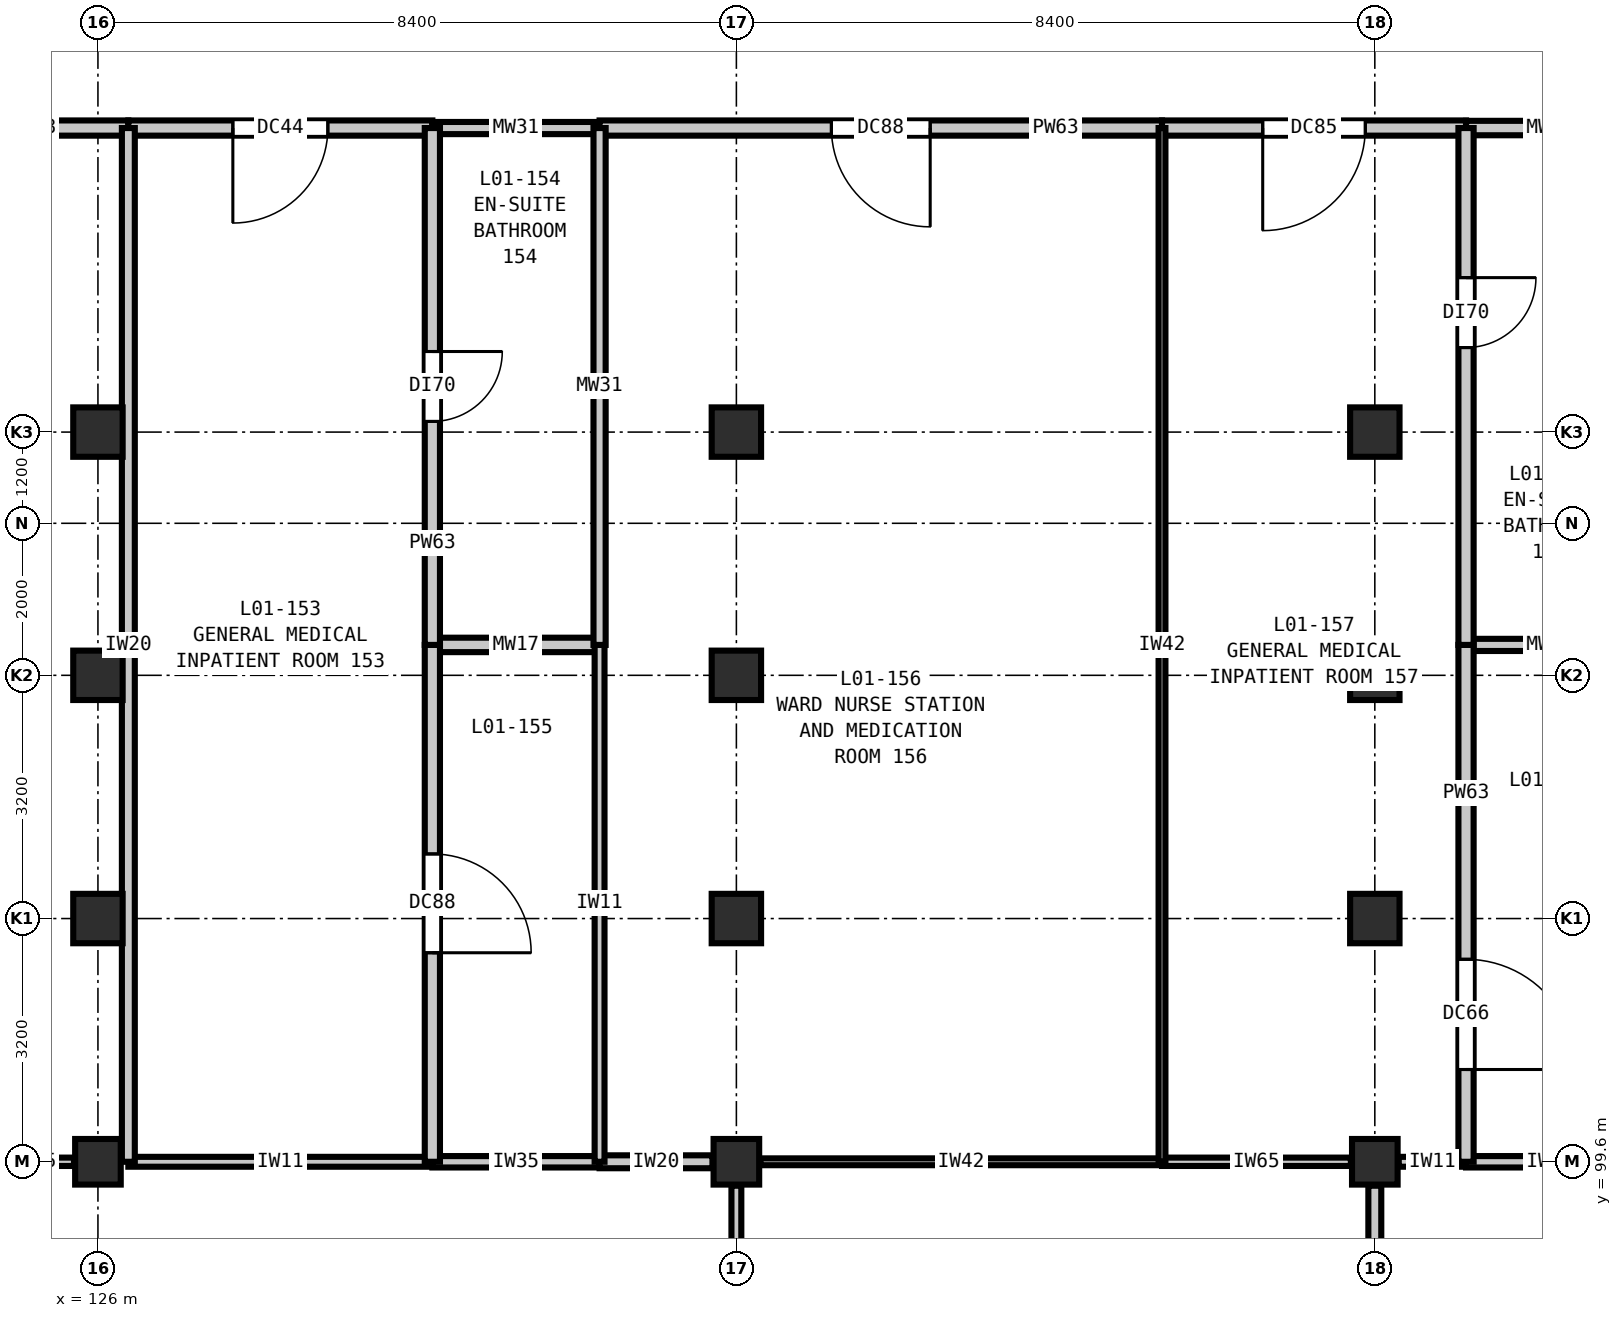
"""IFC4 building model, lengths in metres.
Left out: names, types, materials, properties, quantities, classifications, styles, units other than length and angle.
Written with IfcOpenShell. Run it as: python <this file> out.ifc"""

import sys

from ifc_helpers import new_model, si_unit, direction, frame, frame_2d, origin, origin_2d, place, context, subcontext, project, spatial, rectangle, extrude, element, fill, save


model = new_model("IFC4")
c1 = context("Model", 3, precision=1e-05, world=origin(), true_north=direction((0.0, 1.0)))
c2 = subcontext(c1, "Body", "Model", "MODEL_VIEW")
j1 = project(units=[si_unit("LENGTHUNIT", "METRE"), si_unit("PLANEANGLEUNIT", "RADIAN")], contexts=[c1])
p1 = place(None, origin())
s1 = spatial("IfcSite", under=j1, at=p1, CompositionType="ELEMENT")
p2 = place(p1, origin())
s2 = spatial("IfcBuilding", under=s1, at=p2, CompositionType="ELEMENT")
p3 = place(p2, frame((0.0, 0.0, 5.4)))
s3 = spatial("IfcBuildingStorey", under=s2, at=p3, CompositionType="ELEMENT", Elevation=5.4)
p4 = place(p3, frame((126.0, 99.6, 0.0), z_axis=(0.0, 0.0, 1.0), x_axis=(1.0, 0.0, 0.0)))
e1 = element("IfcColumn", 1, at=p4, inside=s3, PredefinedType="COLUMN", context=c2, shape_type="SweptSolid", body=[
    extrude(rectangle(XDim=0.6, YDim=0.6, at=origin_2d()), origin(), (0.0, 0.0, 1.0), 5.4),
])
for number, where, z_axis, x_axis in (
    (2, (126.0, 102.8, 0.0), (0.0, 0.0, 1.0), (1.0, 0.0, 0.0)),
    (3, (126.0, 106.0, 0.0), (0.0, 0.0, 1.0), (1.0, 0.0, 0.0)),
    (4, (126.0, 109.2, 0.0), (0.0, 0.0, 1.0), (1.0, 0.0, 0.0)),
):
    element("IfcColumn", number, at=place(p3, frame(where, z_axis=z_axis, x_axis=x_axis)), inside=s3, PredefinedType="COLUMN", context=c2, shape_type="SweptSolid", body=[
        extrude(rectangle(XDim=0.65, YDim=0.65, at=origin_2d()), origin(), (0.0, 0.0, 1.0), 5.4),
    ])
p5 = place(p3, frame((134.4, 99.6, 0.0), z_axis=(0.0, 0.0, 1.0), x_axis=(1.0, 0.0, 0.0)))
e5 = element("IfcColumn", 5, at=p5, inside=s3, PredefinedType="COLUMN", context=c2, shape_type="SweptSolid", body=[
    extrude(rectangle(XDim=0.6, YDim=0.6, at=origin_2d()), origin(), (0.0, 0.0, 1.0), 5.4),
])
for number, where, z_axis, x_axis in (
    (6, (134.4, 102.8, 0.0), (0.0, 0.0, 1.0), (1.0, 0.0, 0.0)),
    (7, (134.4, 106.0, 0.0), (0.0, 0.0, 1.0), (1.0, 0.0, 0.0)),
    (8, (134.4, 109.2, 0.0), (0.0, 0.0, 1.0), (1.0, 0.0, 0.0)),
):
    element("IfcColumn", number, at=place(p3, frame(where, z_axis=z_axis, x_axis=x_axis)), inside=s3, PredefinedType="COLUMN", context=c2, shape_type="SweptSolid", body=[
        extrude(rectangle(XDim=0.65, YDim=0.65, at=origin_2d()), origin(), (0.0, 0.0, 1.0), 5.4),
    ])
p6 = place(p3, frame((142.8, 99.6, 0.0), z_axis=(0.0, 0.0, 1.0), x_axis=(1.0, 0.0, 0.0)))
e9 = element("IfcColumn", 9, at=p6, inside=s3, PredefinedType="COLUMN", context=c2, shape_type="SweptSolid", body=[
    extrude(rectangle(XDim=0.6, YDim=0.6, at=origin_2d()), origin(), (0.0, 0.0, 1.0), 5.4),
])
for number, where, z_axis, x_axis in (
    (10, (142.8, 102.8, 0.0), (0.0, 0.0, 1.0), (1.0, 0.0, 0.0)),
    (11, (142.8, 106.0, 0.0), (0.0, 0.0, 1.0), (1.0, 0.0, 0.0)),
    (12, (142.8, 109.2, 0.0), (0.0, 0.0, 1.0), (1.0, 0.0, 0.0)),
):
    element("IfcColumn", number, at=place(p3, frame(where, z_axis=z_axis, x_axis=x_axis)), inside=s3, PredefinedType="COLUMN", context=c2, shape_type="SweptSolid", body=[
        extrude(rectangle(XDim=0.65, YDim=0.65, at=origin_2d()), origin(), (0.0, 0.0, 1.0), 5.4),
    ])
p7 = place(p3, frame((124.6, 99.6, 0.0), z_axis=(0.0, 0.0, 1.0), x_axis=(1.0, 0.0, 0.0)))
e13 = element("IfcWall", 13, at=p7, inside=s3, PredefinedType="PARTITIONING", context=c2, shape_type="SweptSolid", body=[
    extrude(rectangle(XDim=1.085, YDim=0.11, at=frame_2d((0.542, 0.0))), origin(), (0.0, 0.0, 1.0), 4.685),
])
p8 = place(p3, frame((126.4, 99.6, 0.0), z_axis=(0.0, 0.0, 1.0), x_axis=(1.0, 0.0, 0.0)))
e14 = element("IfcWall", 14, at=p8, inside=s3, PredefinedType="PARTITIONING", context=c2, shape_type="SweptSolid", body=[
    extrude(rectangle(XDim=4.0, YDim=0.13, at=frame_2d((2.0, 0.0))), origin(), (0.0, 0.0, 1.0), 4.685),
])
p9 = place(p3, frame((130.4, 99.6, 0.0), z_axis=(0.0, 0.0, 1.0), x_axis=(1.0, 0.0, 0.0)))
e15 = element("IfcWall", 15, at=p9, inside=s3, PredefinedType="PARTITIONING", context=c2, shape_type="SweptSolid", body=[
    extrude(rectangle(XDim=2.2, YDim=0.15, at=frame_2d((1.1, 0.0))), origin(), (0.0, 0.0, 1.0), 4.685),
])
p10 = place(p3, frame((132.6, 99.6, 0.0), z_axis=(0.0, 0.0, 1.0), x_axis=(1.0, 0.0, 0.0)))
e16 = element("IfcWall", 16, at=p10, inside=s3, PredefinedType="PARTITIONING", context=c2, shape_type="SweptSolid", body=[
    extrude(rectangle(XDim=1.485, YDim=0.17, at=frame_2d((0.742, 0.0))), origin(), (0.0, 0.0, 1.0), 4.685),
])
p11 = place(p3, frame((134.715, 99.6, 0.0), z_axis=(0.0, 0.0, 1.0), x_axis=(1.0, 0.0, 0.0)))
e17 = element("IfcWall", 17, at=p11, inside=s3, PredefinedType="PARTITIONING", context=c2, shape_type="SweptSolid", body=[
    extrude(rectangle(XDim=5.285, YDim=0.09, at=frame_2d((2.643, 0.0))), origin(), (0.0, 0.0, 1.0), 4.685),
])
p12 = place(p3, frame((140.0, 99.6, 0.0), z_axis=(0.0, 0.0, 1.0), x_axis=(1.0, 0.0, 0.0)))
e18 = element("IfcWall", 18, at=p12, inside=s3, PredefinedType="PARTITIONING", context=c2, shape_type="SweptSolid", body=[
    extrude(rectangle(XDim=2.485, YDim=0.11, at=frame_2d((1.243, 0.0))), origin(), (0.0, 0.0, 1.0), 4.685),
])
p13 = place(p3, frame((143.115, 99.6, 0.0), z_axis=(0.0, 0.0, 1.0), x_axis=(1.0, 0.0, 0.0)))
e19 = element("IfcWall", 19, at=p13, inside=s3, PredefinedType="PARTITIONING", context=c2, shape_type="SweptSolid", body=[
    extrude(rectangle(XDim=0.885, YDim=0.13, at=frame_2d((0.442, 0.0))), origin(), (0.0, 0.0, 1.0), 4.685),
])
p14 = place(p3, frame((144.0, 99.6, 0.0), z_axis=(0.0, 0.0, 1.0), x_axis=(1.0, 0.0, 0.0)))
e20 = element("IfcWall", 20, at=p14, inside=s3, PredefinedType="PARTITIONING", context=c2, shape_type="SweptSolid", body=[
    extrude(rectangle(XDim=2.2, YDim=0.15, at=frame_2d((1.1, 0.0))), origin(), (0.0, 0.0, 1.0), 4.685),
])
p15 = place(p3, frame((130.4, 106.4, 0.0), z_axis=(0.0, 0.0, 1.0), x_axis=(1.0, 0.0, 0.0)))
e21 = element("IfcWall", 21, at=p15, inside=s3, PredefinedType="PLUMBINGWALL", context=c2, shape_type="SweptSolid", body=[
    extrude(rectangle(XDim=2.2, YDim=0.19, at=frame_2d((1.1, 0.0))), origin(), (0.0, 0.0, 1.0), 5.05),
])
p16 = place(p3, frame((144.0, 106.4, 0.0), z_axis=(0.0, 0.0, 1.0), x_axis=(1.0, 0.0, 0.0)))
e22 = element("IfcWall", 22, at=p16, inside=s3, PredefinedType="PLUMBINGWALL", context=c2, shape_type="SweptSolid", body=[
    extrude(rectangle(XDim=2.2, YDim=0.16, at=frame_2d((1.1, 0.0))), origin(), (0.0, 0.0, 1.0), 5.05),
])
p17 = place(p3, frame((119.0, 113.2, 0.0), z_axis=(0.0, 0.0, 1.0), x_axis=(1.0, 0.0, 0.0)))
e23 = element("IfcWall", 23, at=p17, inside=s3, PredefinedType="PARTITIONING", context=c2, shape_type="SweptSolid", body=[
    extrude(rectangle(XDim=7.4, YDim=0.2, at=frame_2d((3.7, 0.0))), origin(), (0.0, 0.0, 1.0), 5.05),
])
p18 = place(p17, frame((2.775, 0.0, 0.0)))
e24 = element("IfcOpeningElement", 24, at=p18, cuts=e23, PredefinedType="OPENING", context=c2, shape_type="SweptSolid", body=[
    extrude(rectangle(XDim=1.85, YDim=2.3, at=frame_2d((0.925, 1.15))), frame((0.0, 0.11, 0.0), z_axis=(0.0, -1.0, 0.0), x_axis=(1.0, 0.0, 0.0)), (0.0, 0.0, 1.0), 0.22),
])
p19 = place(p3, frame((126.4, 113.2, 0.0), z_axis=(0.0, 0.0, 1.0), x_axis=(1.0, 0.0, 0.0)))
e25 = element("IfcWall", 25, at=p19, inside=s3, PredefinedType="PARTITIONING", context=c2, shape_type="SweptSolid", body=[
    extrude(rectangle(XDim=4.0, YDim=0.2, at=frame_2d((2.0, 0.0))), origin(), (0.0, 0.0, 1.0), 5.05),
])
p20 = place(p19, frame((1.375, 0.0, 0.0)))
e26 = element("IfcOpeningElement", 26, at=p20, cuts=e25, PredefinedType="OPENING", context=c2, shape_type="SweptSolid", body=[
    extrude(rectangle(XDim=1.25, YDim=2.15, at=frame_2d((0.625, 1.075))), frame((0.0, 0.11, 0.0), z_axis=(0.0, -1.0, 0.0), x_axis=(1.0, 0.0, 0.0)), (0.0, 0.0, 1.0), 0.22),
])
p21 = place(p3, frame((130.4, 113.2, 0.0), z_axis=(0.0, 0.0, 1.0), x_axis=(1.0, 0.0, 0.0)))
e27 = element("IfcWall", 27, at=p21, inside=s3, PredefinedType="PLUMBINGWALL", context=c2, shape_type="SweptSolid", body=[
    extrude(rectangle(XDim=2.2, YDim=0.16, at=frame_2d((1.1, 0.0))), origin(), (0.0, 0.0, 1.0), 5.05),
])
p22 = place(p3, frame((132.6, 113.2, 0.0), z_axis=(0.0, 0.0, 1.0), x_axis=(1.0, 0.0, 0.0)))
e28 = element("IfcWall", 28, at=p22, inside=s3, PredefinedType="PARTITIONING", context=c2, shape_type="SweptSolid", body=[
    extrude(rectangle(XDim=7.4, YDim=0.2, at=frame_2d((3.7, 0.0))), origin(), (0.0, 0.0, 1.0), 5.05),
])
p23 = place(p22, frame((3.05, 0.0, 0.0)))
e29 = element("IfcOpeningElement", 29, at=p23, cuts=e28, PredefinedType="OPENING", context=c2, shape_type="SweptSolid", body=[
    extrude(rectangle(XDim=1.3, YDim=2.2, at=frame_2d((0.65, 1.1))), frame((0.0, 0.11, 0.0), z_axis=(0.0, -1.0, 0.0), x_axis=(1.0, 0.0, 0.0)), (0.0, 0.0, 1.0), 0.22),
])
p24 = place(p3, frame((140.0, 113.2, 0.0), z_axis=(0.0, 0.0, 1.0), x_axis=(1.0, 0.0, 0.0)))
e30 = element("IfcWall", 30, at=p24, inside=s3, PredefinedType="PARTITIONING", context=c2, shape_type="SweptSolid", body=[
    extrude(rectangle(XDim=4.0, YDim=0.2, at=frame_2d((2.0, 0.0))), origin(), (0.0, 0.0, 1.0), 5.05),
])
p25 = place(p24, frame((1.325, 0.0, 0.0)))
e31 = element("IfcOpeningElement", 31, at=p25, cuts=e30, PredefinedType="OPENING", context=c2, shape_type="SweptSolid", body=[
    extrude(rectangle(XDim=1.35, YDim=2.2, at=frame_2d((0.675, 1.1))), frame((0.0, 0.11, 0.0), z_axis=(0.0, -1.0, 0.0), x_axis=(1.0, 0.0, 0.0)), (0.0, 0.0, 1.0), 0.22),
])
p26 = place(p3, frame((144.0, 113.2, 0.0), z_axis=(0.0, 0.0, 1.0), x_axis=(1.0, 0.0, 0.0)))
e32 = element("IfcWall", 32, at=p26, inside=s3, PredefinedType="PLUMBINGWALL", context=c2, shape_type="SweptSolid", body=[
    extrude(rectangle(XDim=2.2, YDim=0.19, at=frame_2d((1.1, 0.0))), origin(), (0.0, 0.0, 1.0), 5.05),
])
p27 = place(p3, frame((126.4, 99.6, 0.0), z_axis=(0.0, 0.0, 1.0), x_axis=(0.0, 1.0, 0.0)))
e33 = element("IfcWall", 33, at=p27, inside=s3, PredefinedType="PARTITIONING", context=c2, shape_type="SweptSolid", body=[
    extrude(rectangle(XDim=13.6, YDim=0.17, at=frame_2d((6.8, 0.0))), origin(), (0.0, 0.0, 1.0), 5.05),
])
p28 = place(p3, frame((130.4, 99.6, 0.0), z_axis=(0.0, 0.0, 1.0), x_axis=(0.0, 1.0, 0.0)))
e34 = element("IfcWall", 34, at=p28, inside=s3, PredefinedType="PARTITIONING", context=c2, shape_type="SweptSolid", body=[
    extrude(rectangle(XDim=6.8, YDim=0.2, at=frame_2d((3.4, 0.0))), origin(), (0.0, 0.0, 1.0), 5.05),
])
p29 = place(p28, frame((2.75, 0.0, 0.0)))
e35 = element("IfcOpeningElement", 35, at=p29, cuts=e34, PredefinedType="OPENING", context=c2, shape_type="SweptSolid", body=[
    extrude(rectangle(XDim=1.3, YDim=2.2, at=frame_2d((0.65, 1.1))), frame((0.0, 0.11, 0.0), z_axis=(0.0, -1.0, 0.0), x_axis=(1.0, 0.0, 0.0)), (0.0, 0.0, 1.0), 0.22),
])
p30 = place(p3, frame((130.4, 106.4, 0.0), z_axis=(0.0, 0.0, 1.0), x_axis=(0.0, 1.0, 0.0)))
e36 = element("IfcWall", 36, at=p30, inside=s3, PredefinedType="PARTITIONING", context=c2, shape_type="SweptSolid", body=[
    extrude(rectangle(XDim=6.8, YDim=0.2, at=frame_2d((3.4, 0.0))), origin(), (0.0, 0.0, 1.0), 5.05),
])
p31 = place(p30, frame((2.94, 0.0, 0.0)))
e37 = element("IfcOpeningElement", 37, at=p31, cuts=e36, PredefinedType="OPENING", context=c2, shape_type="SweptSolid", body=[
    extrude(rectangle(XDim=0.92, YDim=2.1, at=frame_2d((0.46, 1.05))), frame((0.0, 0.11, 0.0), z_axis=(0.0, -1.0, 0.0), x_axis=(1.0, 0.0, 0.0)), (0.0, 0.0, 1.0), 0.22),
])
p32 = place(p3, frame((132.6, 99.6, 0.0), z_axis=(0.0, 0.0, 1.0), x_axis=(0.0, 1.0, 0.0)))
e38 = element("IfcWall", 38, at=p32, inside=s3, PredefinedType="PARTITIONING", context=c2, shape_type="SweptSolid", body=[
    extrude(rectangle(XDim=6.8, YDim=0.13, at=frame_2d((3.4, 0.0))), origin(), (0.0, 0.0, 1.0), 5.05),
])
p33 = place(p3, frame((132.6, 106.4, 0.0), z_axis=(0.0, 0.0, 1.0), x_axis=(0.0, 1.0, 0.0)))
e39 = element("IfcWall", 39, at=p33, inside=s3, PredefinedType="PLUMBINGWALL", context=c2, shape_type="SweptSolid", body=[
    extrude(rectangle(XDim=6.8, YDim=0.16, at=frame_2d((3.4, 0.0))), origin(), (0.0, 0.0, 1.0), 5.05),
])
p34 = place(p3, frame((134.4, 91.515, 0.0), z_axis=(0.0, 0.0, 1.0), x_axis=(0.0, 1.0, 0.0)))
e40 = element("IfcWall", 40, at=p34, inside=s3, PredefinedType="PARTITIONING", context=c2, shape_type="SweptSolid", body=[
    extrude(rectangle(XDim=7.77, YDim=0.13, at=frame_2d((3.885, 0.0))), origin(), (0.0, 0.0, 1.0), 4.735),
])
p35 = place(p3, frame((140.0, 99.6, 0.0), z_axis=(0.0, 0.0, 1.0), x_axis=(0.0, 1.0, 0.0)))
e41 = element("IfcWall", 41, at=p35, inside=s3, PredefinedType="PARTITIONING", context=c2, shape_type="SweptSolid", body=[
    extrude(rectangle(XDim=13.6, YDim=0.09, at=frame_2d((6.8, 0.0))), origin(), (0.0, 0.0, 1.0), 5.05),
])
p36 = place(p3, frame((142.8, 91.515, 0.0), z_axis=(0.0, 0.0, 1.0), x_axis=(0.0, 1.0, 0.0)))
e42 = element("IfcWall", 42, at=p36, inside=s3, PredefinedType="PARTITIONING", context=c2, shape_type="SweptSolid", body=[
    extrude(rectangle(XDim=7.77, YDim=0.17, at=frame_2d((3.885, 0.0))), origin(), (0.0, 0.0, 1.0), 4.735),
])
p37 = place(p3, frame((144.0, 99.6, 0.0), z_axis=(0.0, 0.0, 1.0), x_axis=(0.0, 1.0, 0.0)))
e43 = element("IfcWall", 43, at=p37, inside=s3, PredefinedType="PARTITIONING", context=c2, shape_type="SweptSolid", body=[
    extrude(rectangle(XDim=6.8, YDim=0.2, at=frame_2d((3.4, 0.0))), origin(), (0.0, 0.0, 1.0), 5.05),
])
p38 = place(p37, frame((1.214, 0.0, 0.0)))
e44 = element("IfcOpeningElement", 44, at=p38, cuts=e43, PredefinedType="OPENING", context=c2, shape_type="SweptSolid", body=[
    extrude(rectangle(XDim=1.45, YDim=2.25, at=frame_2d((0.725, 1.125))), frame((0.0, 0.11, 0.0), z_axis=(0.0, -1.0, 0.0), x_axis=(1.0, 0.0, 0.0)), (0.0, 0.0, 1.0), 0.22),
])
p39 = place(p3, frame((144.0, 106.4, 0.0), z_axis=(0.0, 0.0, 1.0), x_axis=(0.0, 1.0, 0.0)))
e45 = element("IfcWall", 45, at=p39, inside=s3, PredefinedType="PARTITIONING", context=c2, shape_type="SweptSolid", body=[
    extrude(rectangle(XDim=6.8, YDim=0.2, at=frame_2d((3.4, 0.0))), origin(), (0.0, 0.0, 1.0), 5.05),
])
p40 = place(p39, frame((3.912, 0.0, 0.0)))
e46 = element("IfcOpeningElement", 46, at=p40, cuts=e45, PredefinedType="OPENING", context=c2, shape_type="SweptSolid", body=[
    extrude(rectangle(XDim=0.92, YDim=2.1, at=frame_2d((0.46, 1.05))), frame((0.0, 0.11, 0.0), z_axis=(0.0, -1.0, 0.0), x_axis=(1.0, 0.0, 0.0)), (0.0, 0.0, 1.0), 0.22),
])
p41 = place(p20, frame((1.25, 0.0, 0.0), z_axis=(0.0, 0.0, 1.0), x_axis=(-1.0, 0.0, 0.0)))
e47 = element("IfcDoor", 47, at=p41, inside=s3, OperationType="SINGLE_SWING_RIGHT", PredefinedType="DOOR", context=c2, shape_type="SweptSolid", body=[
    extrude(rectangle(XDim=1.25, YDim=2.15, at=frame_2d((0.625, 1.075))), frame((0.0, 0.025, 0.0), z_axis=(0.0, -1.0, 0.0), x_axis=(1.0, 0.0, 0.0)), (0.0, 0.0, 1.0), 0.05),
])
fill(e26, e47)
p42 = place(p23, frame((1.3, 0.0, 0.0), z_axis=(0.0, 0.0, 1.0), x_axis=(-1.0, 0.0, 0.0)))
e48 = element("IfcDoor", 48, at=p42, inside=s3, OperationType="SINGLE_SWING_LEFT", PredefinedType="DOOR", context=c2, shape_type="SweptSolid", body=[
    extrude(rectangle(XDim=1.3, YDim=2.2, at=frame_2d((0.65, 1.1))), frame((0.0, 0.025, 0.0), z_axis=(0.0, -1.0, 0.0), x_axis=(1.0, 0.0, 0.0)), (0.0, 0.0, 1.0), 0.05),
])
fill(e29, e48)
p43 = place(p25, frame((1.35, 0.0, 0.0), z_axis=(0.0, 0.0, 1.0), x_axis=(-1.0, 0.0, 0.0)))
e49 = element("IfcDoor", 49, at=p43, inside=s3, OperationType="SINGLE_SWING_RIGHT", PredefinedType="DOOR", context=c2, shape_type="SweptSolid", body=[
    extrude(rectangle(XDim=1.35, YDim=2.2, at=frame_2d((0.675, 1.1))), frame((0.0, 0.025, 0.0), z_axis=(0.0, -1.0, 0.0), x_axis=(1.0, 0.0, 0.0)), (0.0, 0.0, 1.0), 0.05),
])
fill(e31, e49)
p44 = place(p29, frame((1.3, 0.0, 0.0), z_axis=(0.0, 0.0, 1.0), x_axis=(-1.0, 0.0, 0.0)))
e50 = element("IfcDoor", 50, at=p44, inside=s3, OperationType="SINGLE_SWING_RIGHT", PredefinedType="DOOR", context=c2, shape_type="SweptSolid", body=[
    extrude(rectangle(XDim=1.3, YDim=2.2, at=frame_2d((0.65, 1.1))), frame((0.0, 0.025, 0.0), z_axis=(0.0, -1.0, 0.0), x_axis=(1.0, 0.0, 0.0)), (0.0, 0.0, 1.0), 0.05),
])
fill(e35, e50)
p45 = place(p31, frame((0.92, 0.0, 0.0), z_axis=(0.0, 0.0, 1.0), x_axis=(-1.0, 0.0, 0.0)))
e51 = element("IfcDoor", 51, at=p45, inside=s3, OperationType="SINGLE_SWING_LEFT", PredefinedType="DOOR", context=c2, shape_type="SweptSolid", body=[
    extrude(rectangle(XDim=0.92, YDim=2.1, at=frame_2d((0.46, 1.05))), frame((0.0, 0.025, 0.0), z_axis=(0.0, -1.0, 0.0), x_axis=(1.0, 0.0, 0.0)), (0.0, 0.0, 1.0), 0.05),
])
fill(e37, e51)
p46 = place(p38, frame((1.45, 0.0, 0.0), z_axis=(0.0, 0.0, 1.0), x_axis=(-1.0, 0.0, 0.0)))
e52 = element("IfcDoor", 52, at=p46, inside=s3, OperationType="SINGLE_SWING_RIGHT", PredefinedType="DOOR", context=c2, shape_type="SweptSolid", body=[
    extrude(rectangle(XDim=1.45, YDim=2.25, at=frame_2d((0.725, 1.125))), frame((0.0, 0.025, 0.0), z_axis=(0.0, -1.0, 0.0), x_axis=(1.0, 0.0, 0.0)), (0.0, 0.0, 1.0), 0.05),
])
fill(e44, e52)
p47 = place(p40, frame((0.92, 0.0, 0.0), z_axis=(0.0, 0.0, 1.0), x_axis=(-1.0, 0.0, 0.0)))
e53 = element("IfcDoor", 53, at=p47, inside=s3, OperationType="SINGLE_SWING_LEFT", PredefinedType="DOOR", context=c2, shape_type="SweptSolid", body=[
    extrude(rectangle(XDim=0.92, YDim=2.1, at=frame_2d((0.46, 1.05))), frame((0.0, 0.025, 0.0), z_axis=(0.0, -1.0, 0.0), x_axis=(1.0, 0.0, 0.0)), (0.0, 0.0, 1.0), 0.05),
])
fill(e46, e53)
save(model, sys.argv[1])
